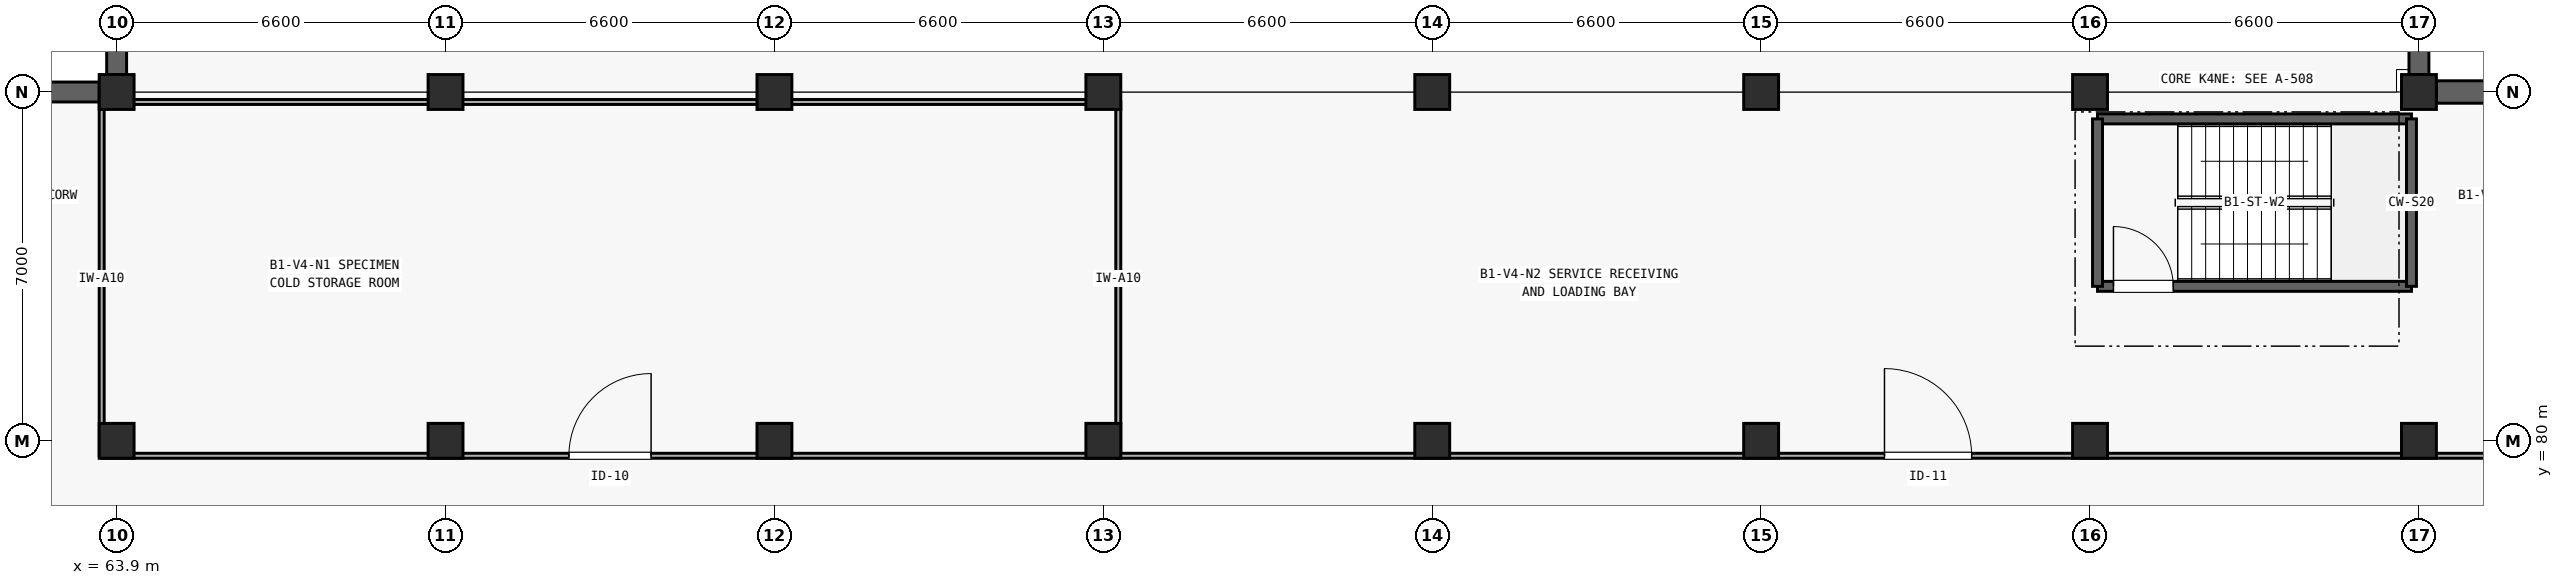
"""IFC4 building model, lengths in metres.
Left out: names, types, materials, properties, quantities, classifications, styles, units other than length and angle.
Written with IfcOpenShell. Run it as: python <this file> out.ifc"""

import sys

from ifc_helpers import new_model, si_unit, direction, frame, frame_2d, origin, origin_2d, place, context, subcontext, project, spatial, rectangle, extrude, element, fill, save


model = new_model("IFC4")
c1 = context("Model", 3, precision=1e-05, world=origin(), true_north=direction((0.0, 1.0)))
c2 = subcontext(c1, "Body", "Model", "MODEL_VIEW")
j1 = project(units=[si_unit("LENGTHUNIT", "METRE"), si_unit("PLANEANGLEUNIT", "RADIAN")], contexts=[c1])
p1 = place(None, origin())
s1 = spatial("IfcSite", under=j1, at=p1, CompositionType="ELEMENT")
p2 = place(p1, origin())
s2 = spatial("IfcBuilding", under=s1, at=p2, CompositionType="ELEMENT")
p3 = place(p2, frame((0.0, 0.0, -4.2)))
s3 = spatial("IfcBuildingStorey", under=s2, at=p3, CompositionType="ELEMENT", Elevation=-4.2)
for number, where, z_axis, x_axis in (
    (1, (63.9, 80.0, -0.4), (0.0, 0.0, 1.0), (1.0, 0.0, 0.0)),
    (2, (63.9, 87.0, -0.4), (0.0, 0.0, 1.0), (1.0, 0.0, 0.0)),
    (3, (70.5, 80.0, -0.4), (0.0, 0.0, 1.0), (1.0, 0.0, 0.0)),
    (4, (70.5, 87.0, -0.4), (0.0, 0.0, 1.0), (1.0, 0.0, 0.0)),
    (5, (77.1, 80.0, -0.4), (0.0, 0.0, 1.0), (1.0, 0.0, 0.0)),
    (6, (77.1, 87.0, -0.4), (0.0, 0.0, 1.0), (1.0, 0.0, 0.0)),
    (7, (83.7, 80.0, -0.4), (0.0, 0.0, 1.0), (1.0, 0.0, 0.0)),
    (8, (83.7, 87.0, -0.4), (0.0, 0.0, 1.0), (1.0, 0.0, 0.0)),
    (9, (90.3, 80.0, -0.4), (0.0, 0.0, 1.0), (1.0, 0.0, 0.0)),
    (10, (90.3, 87.0, -0.4), (0.0, 0.0, 1.0), (1.0, 0.0, 0.0)),
    (11, (96.9, 80.0, -0.4), (0.0, 0.0, 1.0), (1.0, 0.0, 0.0)),
    (12, (96.9, 87.0, -0.4), (0.0, 0.0, 1.0), (1.0, 0.0, 0.0)),
    (13, (103.5, 80.0, -0.4), (0.0, 0.0, 1.0), (1.0, 0.0, 0.0)),
    (14, (103.5, 87.0, -0.4), (0.0, 0.0, 1.0), (1.0, 0.0, 0.0)),
    (15, (110.1, 80.0, -0.4), (0.0, 0.0, 1.0), (1.0, 0.0, 0.0)),
    (16, (110.1, 87.0, -0.4), (0.0, 0.0, 1.0), (1.0, 0.0, 0.0)),
):
    element("IfcColumn", number, at=place(p3, frame(where, z_axis=z_axis, x_axis=x_axis)), inside=s3, PredefinedType="COLUMN", context=c2, shape_type="SweptSolid", body=[
        extrude(rectangle(XDim=0.7, YDim=0.7, at=origin_2d()), origin(), (0.0, 0.0, 1.0), 4.6),
    ])
p4 = place(p3, frame((57.65, 87.0, 0.0), z_axis=(0.0, 0.0, 1.0), x_axis=(1.0, 0.0, 0.0)))
e17 = element("IfcWall", 17, at=p4, inside=s3, PredefinedType="SHEAR", context=c2, shape_type="SweptSolid", body=[
    extrude(rectangle(XDim=5.9, YDim=0.4, at=frame_2d((2.95, 0.0))), origin(), (0.0, 0.0, 1.0), 3.85),
])
p5 = place(p3, frame((110.45, 87.0, 0.0), z_axis=(0.0, 0.0, 1.0), x_axis=(1.0, 0.0, 0.0)))
e18 = element("IfcWall", 18, at=p5, inside=s3, PredefinedType="SHEAR", context=c2, shape_type="SweptSolid", body=[
    extrude(rectangle(XDim=5.9, YDim=0.45, at=frame_2d((2.95, 0.0))), origin(), (0.0, 0.0, 1.0), 3.85),
])
for number, where, z_axis, x_axis in (
    (19, (63.9, 87.35, 0.0), (0.0, 0.0, 1.0), (0.0, 1.0, 0.0)),
    (20, (110.1, 87.35, 0.0), (0.0, 0.0, 1.0), (0.0, 1.0, 0.0)),
):
    element("IfcWall", number, at=place(p3, frame(where, z_axis=z_axis, x_axis=x_axis)), inside=s3, PredefinedType="SHEAR", context=c2, shape_type="SweptSolid", body=[
        extrude(rectangle(XDim=6.3, YDim=0.4, at=frame_2d((3.15, 0.0))), origin(), (0.0, 0.0, 1.0), 3.85),
    ])
p6 = place(p3, frame((103.65, 83.1, -0.4), z_axis=(0.0, 0.0, 1.0), x_axis=(1.0, 0.0, 0.0)))
e21 = element("IfcWall", 21, at=p6, inside=s3, PredefinedType="SHEAR", context=c2, shape_type="SweptSolid", body=[
    extrude(rectangle(XDim=6.3, YDim=0.2, at=frame_2d((3.15, 0.0))), origin(), (0.0, 0.0, 1.0), 4.6),
])
p7 = place(p6, frame((0.32, 0.0, 0.4)))
e22 = element("IfcOpeningElement", 22, at=p7, cuts=e21, PredefinedType="OPENING", context=c2, shape_type="SweptSolid", body=[
    extrude(rectangle(XDim=1.2, YDim=2.15, at=frame_2d((0.6, 1.075))), frame((0.0, 0.11, 0.0), z_axis=(0.0, -1.0, 0.0), x_axis=(1.0, 0.0, 0.0)), (0.0, 0.0, 1.0), 0.22),
])
p8 = place(p3, frame((103.65, 86.46, -0.4), z_axis=(0.0, 0.0, 1.0), x_axis=(1.0, 0.0, 0.0)))
e23 = element("IfcWall", 23, at=p8, inside=s3, PredefinedType="SHEAR", context=c2, shape_type="SweptSolid", body=[
    extrude(rectangle(XDim=6.3, YDim=0.2, at=frame_2d((3.15, 0.0))), origin(), (0.0, 0.0, 1.0), 4.6),
])
for number, where, z_axis, x_axis in (
    (24, (103.65, 83.1, -0.4), (0.0, 0.0, 1.0), (0.0, 1.0, 0.0)),
    (25, (109.95, 83.1, -0.4), (0.0, 0.0, 1.0), (0.0, 1.0, 0.0)),
):
    element("IfcWall", number, at=place(p3, frame(where, z_axis=z_axis, x_axis=x_axis)), inside=s3, PredefinedType="SHEAR", context=c2, shape_type="SweptSolid", body=[
        extrude(rectangle(XDim=3.36, YDim=0.2, at=frame_2d((1.68, 0.0))), origin(), (0.0, 0.0, 1.0), 4.6),
    ])
p9 = place(p3, frame((63.6, 79.7, 0.0), z_axis=(0.0, 0.0, 1.0), x_axis=(1.0, 0.0, 0.0)))
e26 = element("IfcWall", 26, at=p9, inside=s3, PredefinedType="PARTITIONING", context=c2, shape_type="SweptSolid", body=[
    extrude(rectangle(XDim=20.4, YDim=0.1, at=frame_2d((10.2, 0.0))), origin(), (0.0, 0.0, 1.0), 3.345),
])
p10 = place(p9, frame((9.375, 0.0, 0.0)))
e27 = element("IfcOpeningElement", 27, at=p10, cuts=e26, PredefinedType="OPENING", context=c2, shape_type="SweptSolid", body=[
    extrude(rectangle(XDim=1.65, YDim=2.25, at=frame_2d((0.825, 1.125))), frame((0.0, 0.06, 0.0), z_axis=(0.0, -1.0, 0.0), x_axis=(1.0, 0.0, 0.0)), (0.0, 0.0, 1.0), 0.12),
])
p11 = place(p3, frame((63.6, 86.8, 0.0), z_axis=(0.0, 0.0, 1.0), x_axis=(1.0, 0.0, 0.0)))
e28 = element("IfcWall", 28, at=p11, inside=s3, PredefinedType="PARTITIONING", context=c2, shape_type="SweptSolid", body=[
    extrude(rectangle(XDim=20.4, YDim=0.1, at=frame_2d((10.2, 0.0))), origin(), (0.0, 0.0, 1.0), 3.345),
])
for number, where, z_axis, x_axis in (
    (29, (63.6, 79.7, 0.0), (0.0, 0.0, 1.0), (0.0, 1.0, 0.0)),
    (30, (84.0, 79.7, 0.0), (0.0, 0.0, 1.0), (0.0, 1.0, 0.0)),
):
    element("IfcWall", number, at=place(p3, frame(where, z_axis=z_axis, x_axis=x_axis)), inside=s3, PredefinedType="PARTITIONING", context=c2, shape_type="SweptSolid", body=[
        extrude(rectangle(XDim=7.1, YDim=0.1, at=frame_2d((3.55, 0.0))), origin(), (0.0, 0.0, 1.0), 3.425),
    ])
p12 = place(p3, frame((84.0, 79.7, 0.0), z_axis=(0.0, 0.0, 1.0), x_axis=(1.0, 0.0, 0.0)))
e31 = element("IfcWall", 31, at=p12, inside=s3, PredefinedType="PARTITIONING", context=c2, shape_type="SweptSolid", body=[
    extrude(rectangle(XDim=32.5, YDim=0.1, at=frame_2d((16.25, 0.0))), origin(), (0.0, 0.0, 1.0), 3.135),
])
p13 = place(p12, frame((15.375, 0.0, 0.0)))
e32 = element("IfcOpeningElement", 32, at=p13, cuts=e31, PredefinedType="OPENING", context=c2, shape_type="SweptSolid", body=[
    extrude(rectangle(XDim=1.75, YDim=2.25, at=frame_2d((0.875, 1.125))), frame((0.0, 0.06, 0.0), z_axis=(0.0, -1.0, 0.0), x_axis=(1.0, 0.0, 0.0)), (0.0, 0.0, 1.0), 0.12),
])
p14 = place(p7, origin())
e33 = element("IfcDoor", 33, at=p14, inside=s3, OperationType="SINGLE_SWING_LEFT", PredefinedType="DOOR", context=c2, shape_type="SweptSolid", body=[
    extrude(rectangle(XDim=1.2, YDim=2.15, at=frame_2d((0.6, 1.075))), frame((0.0, 0.025, 0.0), z_axis=(0.0, -1.0, 0.0), x_axis=(1.0, 0.0, 0.0)), (0.0, 0.0, 1.0), 0.05),
])
fill(e22, e33)
p15 = place(p10, origin())
e34 = element("IfcDoor", 34, at=p15, inside=s3, OperationType="SINGLE_SWING_RIGHT", PredefinedType="DOOR", context=c2, shape_type="SweptSolid", body=[
    extrude(rectangle(XDim=1.65, YDim=2.25, at=frame_2d((0.825, 1.125))), frame((0.0, 0.025, 0.0), z_axis=(0.0, -1.0, 0.0), x_axis=(1.0, 0.0, 0.0)), (0.0, 0.0, 1.0), 0.05),
])
fill(e27, e34)
p16 = place(p13, origin())
e35 = element("IfcDoor", 35, at=p16, inside=s3, OperationType="SINGLE_SWING_LEFT", PredefinedType="DOOR", context=c2, shape_type="SweptSolid", body=[
    extrude(rectangle(XDim=1.75, YDim=2.25, at=frame_2d((0.875, 1.125))), frame((0.0, 0.025, 0.0), z_axis=(0.0, -1.0, 0.0), x_axis=(1.0, 0.0, 0.0)), (0.0, 0.0, 1.0), 0.05),
])
fill(e32, e35)
save(model, sys.argv[1])
